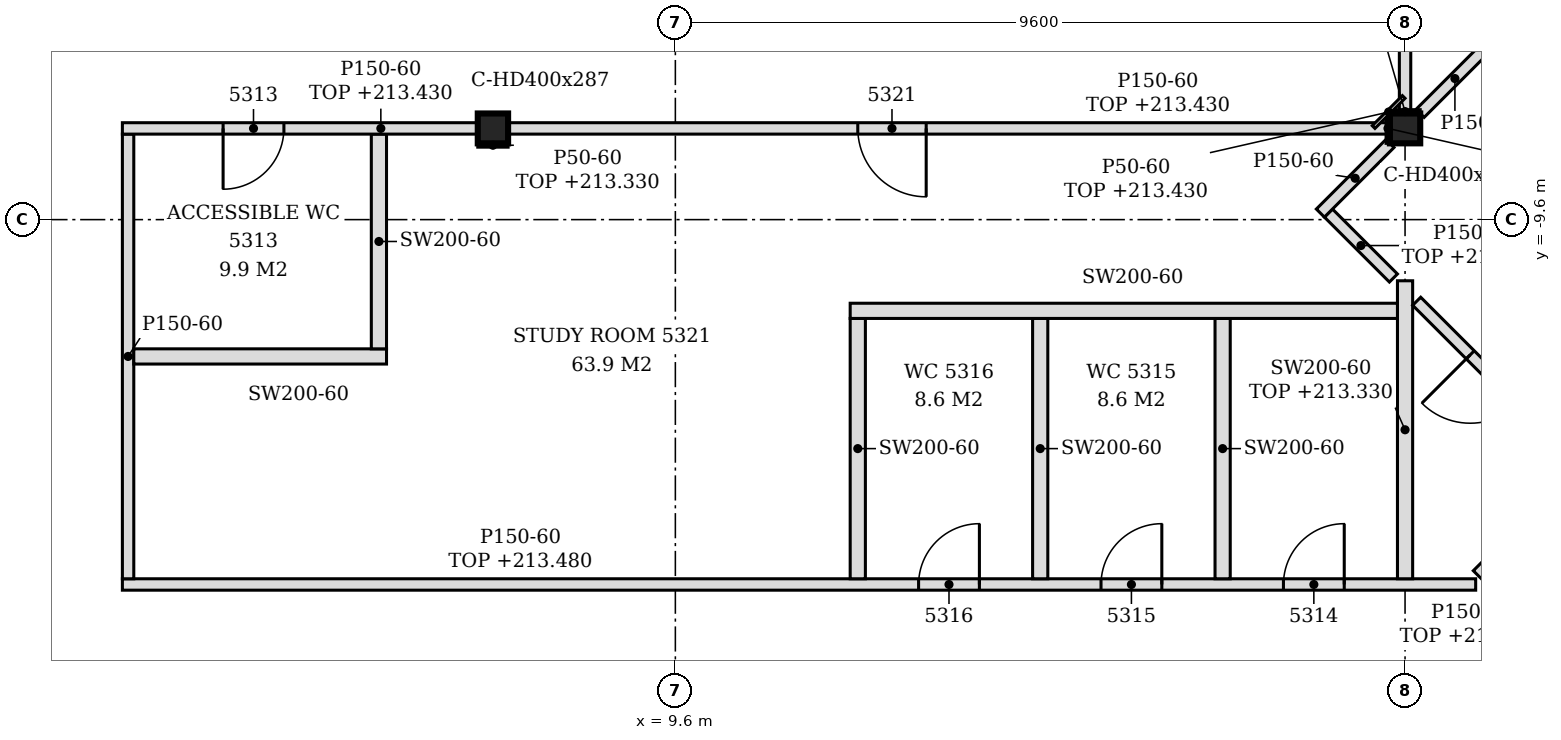
"""IFC4 building model, lengths in metres.
Left out: names, types, materials, properties, quantities, classifications, styles, units other than length and angle.
Written with IfcOpenShell. Run it as: python <this file> out.ifc"""

import sys

from ifc_helpers import new_model, si_unit, direction, frame, frame_2d, origin, origin_2d, place, context, subcontext, project, spatial, polyline, rectangle, i_section, outline, extrude, element, fill, save


model = new_model("IFC4")
c1 = context("Model", 3, precision=1e-05, world=origin(), true_north=direction((0.0, 1.0)))
c2 = subcontext(c1, "Body", "Model", "MODEL_VIEW")
j1 = project(units=[si_unit("LENGTHUNIT", "METRE"), si_unit("PLANEANGLEUNIT", "RADIAN")], contexts=[c1])
p1 = place(None, origin())
s1 = spatial("IfcSite", under=j1, at=p1, CompositionType="ELEMENT")
p2 = place(p1, origin())
s2 = spatial("IfcBuilding", under=s1, at=p2, CompositionType="ELEMENT")
p3 = place(p2, frame((0.0, 0.0, 210.6)))
s3 = spatial("IfcBuildingStorey", under=s2, at=p3, CompositionType="ELEMENT", Elevation=210.6)
for number, where, z_axis, x_axis in (
    (1, (7.2, -8.4, -0.15), (0.0, 0.0, 1.0), (1.0, 0.0, 0.0)),
    (2, (19.2, -8.4, -0.15), (0.0, 0.0, 1.0), (1.0, 0.0, 0.0)),
):
    element("IfcColumn", number, at=place(p3, frame(where, z_axis=z_axis, x_axis=x_axis)), inside=s3, PredefinedType="COLUMN", context=c2, shape_type="SweptSolid", body=[
        extrude(i_section(OverallWidth=0.399, OverallDepth=0.393, WebThickness=0.023, FlangeThickness=0.037, FilletRadius=0.015, at=origin_2d()), origin(), (0.0, 0.0, 1.0), 3.6),
    ])
p4 = place(p3, frame((2.325, -14.4, 0.0), z_axis=(0.0, 0.0, 1.0), x_axis=(1.0, 0.0, 0.0)))
e3 = element("IfcWall", 3, at=p4, inside=s3, PredefinedType="PARTITIONING", context=c2, shape_type="SweptSolid", body=[
    extrude(outline(polyline([(0.0, 0.0), (17.804, 0.0), (17.804, 2.88), (17.025, 2.88), (17.023, 2.73), (16.725, 2.73), (16.723, 2.88), (5.025, 2.88), (5.023, 2.73), (4.725, 2.73), (4.723, 2.88), (0.0, 2.88), (0.0, 0.0)])), frame((0.0, 0.075, 0.0), z_axis=(0.0, -1.0, 0.0), x_axis=(1.0, 0.0, 0.0)), (0.0, 0.0, 1.0), 0.15),
])
p5 = place(p4, frame((15.275, 0.0, 0.0)))
e4 = element("IfcOpeningElement", 4, at=p5, cuts=e3, PredefinedType="OPENING", context=c2, shape_type="SweptSolid", body=[
    extrude(rectangle(XDim=0.8, YDim=2.1, at=frame_2d((0.4, 1.05))), frame((0.0, 0.085, 0.0), z_axis=(0.0, -1.0, 0.0), x_axis=(1.0, 0.0, 0.0)), (0.0, 0.0, 1.0), 0.17),
])
p6 = place(p4, frame((12.875, 0.0, 0.0)))
e5 = element("IfcOpeningElement", 5, at=p6, cuts=e3, PredefinedType="OPENING", context=c2, shape_type="SweptSolid", body=[
    extrude(rectangle(XDim=0.8, YDim=2.1, at=frame_2d((0.4, 1.05))), frame((0.0, 0.085, 0.0), z_axis=(0.0, -1.0, 0.0), x_axis=(1.0, 0.0, 0.0)), (0.0, 0.0, 1.0), 0.17),
])
p7 = place(p4, frame((10.475, 0.0, 0.0)))
e6 = element("IfcOpeningElement", 6, at=p7, cuts=e3, PredefinedType="OPENING", context=c2, shape_type="SweptSolid", body=[
    extrude(rectangle(XDim=0.8, YDim=2.1, at=frame_2d((0.4, 1.05))), frame((0.0, 0.085, 0.0), z_axis=(0.0, -1.0, 0.0), x_axis=(1.0, 0.0, 0.0)), (0.0, 0.0, 1.0), 0.17),
])
p8 = place(p3, frame((2.4, -14.325, 0.0), z_axis=(0.0, 0.0, 1.0), x_axis=(0.0, 1.0, 0.0)))
e7 = element("IfcWall", 7, at=p8, inside=s3, PredefinedType="PARTITIONING", context=c2, shape_type="SweptSolid", body=[
    extrude(outline(polyline([(0.0, 0.0), (5.85, 0.0), (5.85, 2.83), (5.775, 2.83), (5.773, 3.45), (0.025, 3.45), (0.023, 2.93), (0.0, 2.93), (0.0, 0.0)])), frame((0.0, 0.075, 0.0), z_axis=(0.0, -1.0, 0.0), x_axis=(1.0, 0.0, 0.0)), (0.0, 0.0, 1.0), 0.15),
])
for number, where, z_axis, x_axis in (
    (8, (12.0, -14.325, 0.0), (0.0, 0.0, 1.0), (0.0, 1.0, 0.0)),
    (9, (14.4, -14.325, 0.0), (0.0, 0.0, 1.0), (0.0, 1.0, 0.0)),
    (10, (16.8, -14.325, 0.0), (0.0, 0.0, 1.0), (0.0, 1.0, 0.0)),
):
    element("IfcWall", number, at=place(p3, frame(where, z_axis=z_axis, x_axis=x_axis)), inside=s3, PredefinedType="PARTITIONING", context=c2, shape_type="SweptSolid", body=[
        extrude(outline(polyline([(0.0, 0.0), (3.425, 0.0), (3.425, 3.45), (0.03, 3.45), (0.028, 2.88), (0.0, 2.88), (0.0, 0.0)])), frame((0.0, 0.1, 0.0), z_axis=(0.0, -1.0, 0.0), x_axis=(1.0, 0.0, 0.0)), (0.0, 0.0, 1.0), 0.2),
    ])
p9 = place(p3, frame((19.2, -14.325, 0.0), z_axis=(0.0, 0.0, 1.0), x_axis=(0.0, 1.0, 0.0)))
e11 = element("IfcWall", 11, at=p9, inside=s3, PredefinedType="PARTITIONING", context=c2, shape_type="SweptSolid", body=[
    extrude(rectangle(XDim=3.92, YDim=0.2, at=frame_2d((1.96, 0.0))), origin(), (0.0, 0.0, 1.0), 2.73),
])
p10 = place(p3, frame((20.151, -14.272, 0.0), z_axis=(0.0, 0.0, 1.0), x_axis=(0.707106781187, 0.707106781187, 0.0)))
e12 = element("IfcWall", 12, at=p10, inside=s3, PredefinedType="PARTITIONING", context=c2, shape_type="SweptSolid", body=[
    extrude(rectangle(XDim=2.055, YDim=0.15, at=frame_2d((1.027, 0.0))), origin(), (0.0, 0.0, 1.0), 2.88),
])
p11 = place(p3, frame((21.498, -12.819, 0.0), z_axis=(0.0, 0.0, 1.0), x_axis=(-0.707106781187, 0.707106781187, 0.0)))
e13 = element("IfcWall", 13, at=p11, inside=s3, PredefinedType="PARTITIONING", context=c2, shape_type="SweptSolid", body=[
    extrude(rectangle(XDim=3.033, YDim=0.15, at=frame_2d((1.517, 0.0))), origin(), (0.0, 0.0, 1.0), 2.73),
])
p12 = place(p11, frame((1.137, 0.0, 0.0)))
e14 = element("IfcOpeningElement", 14, at=p12, cuts=e13, PredefinedType="OPENING", context=c2, shape_type="SweptSolid", body=[
    extrude(rectangle(XDim=0.9, YDim=2.1, at=frame_2d((0.45, 1.05))), frame((0.0, 0.085, 0.0), z_axis=(0.0, -1.0, 0.0), x_axis=(1.0, 0.0, 0.0)), (0.0, 0.0, 1.0), 0.17),
])
p13 = place(p3, frame((2.475, -11.4, 0.0), z_axis=(0.0, 0.0, 1.0), x_axis=(1.0, 0.0, 0.0)))
e15 = element("IfcWall", 15, at=p13, inside=s3, PredefinedType="PARTITIONING", context=c2, shape_type="SweptSolid", body=[
    extrude(rectangle(XDim=3.325, YDim=0.2, at=frame_2d((1.663, 0.0))), origin(), (0.0, 0.0, 1.0), 3.45),
])
p14 = place(p3, frame((5.7, -11.3, 0.0), z_axis=(0.0, 0.0, 1.0), x_axis=(0.0, 1.0, 0.0)))
e16 = element("IfcWall", 16, at=p14, inside=s3, PredefinedType="PARTITIONING", context=c2, shape_type="SweptSolid", body=[
    extrude(outline(polyline([(0.0, 0.0), (2.825, 0.0), (2.825, 2.83), (2.75, 2.83), (2.748, 3.45), (0.0, 3.45), (0.0, 0.0)])), frame((0.0, 0.1, 0.0), z_axis=(0.0, -1.0, 0.0), x_axis=(1.0, 0.0, 0.0)), (0.0, 0.0, 1.0), 0.2),
])
p15 = place(p3, frame((11.9, -10.8, 0.0), z_axis=(0.0, 0.0, 1.0), x_axis=(1.0, 0.0, 0.0)))
e17 = element("IfcWall", 17, at=p15, inside=s3, PredefinedType="PARTITIONING", context=c2, shape_type="SweptSolid", body=[
    extrude(outline(polyline([(0.0, 0.0), (7.2, 0.0), (7.2, 2.73), (7.15, 2.73), (7.148, 3.45), (0.0, 3.45), (0.0, 0.0)])), frame((0.0, 0.1, 0.0), z_axis=(0.0, -1.0, 0.0), x_axis=(1.0, 0.0, 0.0)), (0.0, 0.0, 1.0), 0.2),
])
p16 = place(p3, frame((19.047, -10.368, 0.0), z_axis=(0.0, 0.0, 1.0), x_axis=(-0.707409718716, 0.706803713817, 0.0)))
e18 = element("IfcWall", 18, at=p16, inside=s3, PredefinedType="PARTITIONING", context=c2, shape_type="SweptSolid", body=[
    extrude(rectangle(XDim=1.208, YDim=0.15, at=frame_2d((0.604, 0.0))), origin(), (0.0, 0.0, 1.0), 2.73),
])
p17 = place(p3, frame((18.086, -9.514, 0.0), z_axis=(0.0, 0.0, 1.0), x_axis=(0.707106781187, 0.707106781187, 0.0)))
e19 = element("IfcWall", 19, at=p17, inside=s3, PredefinedType="PARTITIONING", context=c2, shape_type="SweptSolid", body=[
    extrude(rectangle(XDim=1.295, YDim=0.15, at=frame_2d((0.648, 0.0))), origin(), (0.0, 0.0, 1.0), 3.45),
])
p18 = place(p3, frame((2.325, -8.4, 0.0), z_axis=(0.0, 0.0, 1.0), x_axis=(1.0, 0.0, 0.0)))
e20 = element("IfcWall", 20, at=p18, inside=s3, PredefinedType="PARTITIONING", context=c2, shape_type="SweptSolid", body=[
    extrude(rectangle(XDim=4.676, YDim=0.15, at=frame_2d((2.338, 0.0))), origin(), (0.0, 0.0, 1.0), 2.83),
])
p19 = place(p18, frame((1.325, 0.0, 0.0)))
e21 = element("IfcOpeningElement", 21, at=p19, cuts=e20, PredefinedType="OPENING", context=c2, shape_type="SweptSolid", body=[
    extrude(rectangle(XDim=0.8, YDim=2.1, at=frame_2d((0.4, 1.05))), frame((0.0, 0.085, 0.0), z_axis=(0.0, -1.0, 0.0), x_axis=(1.0, 0.0, 0.0)), (0.0, 0.0, 1.0), 0.17),
])
p20 = place(p3, frame((7.399, -8.4, 0.0), z_axis=(0.0, 0.0, 1.0), x_axis=(1.0, 0.0, 0.0)))
e22 = element("IfcWall", 22, at=p20, inside=s3, PredefinedType="PARTITIONING", context=c2, shape_type="SweptSolid", body=[
    extrude(rectangle(XDim=11.601, YDim=0.15, at=frame_2d((5.801, 0.0))), origin(), (0.0, 0.0, 1.0), 2.83),
])
p21 = place(p20, frame((4.601, 0.0, 0.0)))
e23 = element("IfcOpeningElement", 23, at=p21, cuts=e22, PredefinedType="OPENING", context=c2, shape_type="SweptSolid", body=[
    extrude(rectangle(XDim=0.9, YDim=2.1, at=frame_2d((0.45, 1.05))), frame((0.0, 0.085, 0.0), z_axis=(0.0, -1.0, 0.0), x_axis=(1.0, 0.0, 0.0)), (0.0, 0.0, 1.0), 0.17),
])
p22 = place(p3, frame((19.2, -8.204, 0.0), z_axis=(0.0, 0.0, 1.0), x_axis=(0.0, 1.0, 0.0)))
e24 = element("IfcWall", 24, at=p22, inside=s3, PredefinedType="PARTITIONING", context=c2, shape_type="SweptSolid", body=[
    extrude(rectangle(XDim=4.529, YDim=0.15, at=frame_2d((2.264, 0.0))), origin(), (0.0, 0.0, 1.0), 2.83),
])
p23 = place(p3, frame((19.398, -8.202, 0.0), z_axis=(0.0, 0.0, 1.0), x_axis=(0.707200993001, 0.707012556818, 0.0)))
e25 = element("IfcWall", 25, at=p23, inside=s3, PredefinedType="PARTITIONING", context=c2, shape_type="SweptSolid", body=[
    extrude(rectangle(XDim=1.296, YDim=0.15, at=frame_2d((0.648, 0.0))), origin(), (0.0, 0.0, 1.0), 3.45),
])
p24 = place(p3, frame((18.786, -8.382, 0.0), z_axis=(0.0, 0.0, 1.0), x_axis=(0.707106781187, 0.707106781187, 0.0)))
e26 = element("IfcWall", 26, at=p24, inside=s3, PredefinedType="PARTITIONING", context=c2, shape_type="SweptSolid", body=[
    extrude(rectangle(XDim=0.56, YDim=0.05, at=frame_2d((0.28, 0.0))), origin(), (0.0, 0.0, 1.0), 2.83),
])
p25 = place(p3, frame((7.0, -8.622, 0.0), z_axis=(0.0, 0.0, 1.0), x_axis=(1.0, 0.0, 0.0)))
e27 = element("IfcWall", 27, at=p25, inside=s3, PredefinedType="PARTITIONING", context=c2, shape_type="SweptSolid", body=[
    extrude(rectangle(XDim=0.399, YDim=0.05, at=frame_2d((0.199, 0.0))), origin(), (0.0, 0.0, 1.0), 2.73),
])
p26 = place(p3, frame((19.0, -8.178, 0.0), z_axis=(0.0, 0.0, 1.0), x_axis=(1.0, 0.0, 0.0)))
e28 = element("IfcWall", 28, at=p26, inside=s3, PredefinedType="PARTITIONING", context=c2, shape_type="SweptSolid", body=[
    extrude(rectangle(XDim=0.399, YDim=0.05, at=frame_2d((0.199, 0.0))), origin(), (0.0, 0.0, 1.0), 2.83),
])
p27 = place(p3, frame((18.976, -8.596, 0.0), z_axis=(0.0, 0.0, 1.0), x_axis=(0.0, 1.0, 0.0)))
e29 = element("IfcWall", 29, at=p27, inside=s3, PredefinedType="PARTITIONING", context=c2, shape_type="SweptSolid", body=[
    extrude(rectangle(XDim=0.393, YDim=0.05, at=frame_2d((0.196, 0.0))), origin(), (0.0, 0.0, 1.0), 2.83),
])
p28 = place(p19, frame((0.8, 0.0, 0.0), z_axis=(0.0, 0.0, 1.0), x_axis=(-1.0, 0.0, 0.0)))
e30 = element("IfcDoor", 30, at=p28, inside=s3, OperationType="SINGLE_SWING_RIGHT", PredefinedType="DOOR", context=c2, shape_type="SweptSolid", body=[
    extrude(rectangle(XDim=0.8, YDim=2.1, at=frame_2d((0.4, 1.05))), frame((0.0, 0.025, 0.0), z_axis=(0.0, -1.0, 0.0), x_axis=(1.0, 0.0, 0.0)), (0.0, 0.0, 1.0), 0.05),
])
fill(e21, e30)
p29 = place(p5, origin())
e31 = element("IfcDoor", 31, at=p29, inside=s3, OperationType="SINGLE_SWING_RIGHT", PredefinedType="DOOR", context=c2, shape_type="SweptSolid", body=[
    extrude(rectangle(XDim=0.8, YDim=2.1, at=frame_2d((0.4, 1.05))), frame((0.0, 0.025, 0.0), z_axis=(0.0, -1.0, 0.0), x_axis=(1.0, 0.0, 0.0)), (0.0, 0.0, 1.0), 0.05),
])
fill(e4, e31)
p30 = place(p6, origin())
e32 = element("IfcDoor", 32, at=p30, inside=s3, OperationType="SINGLE_SWING_RIGHT", PredefinedType="DOOR", context=c2, shape_type="SweptSolid", body=[
    extrude(rectangle(XDim=0.8, YDim=2.1, at=frame_2d((0.4, 1.05))), frame((0.0, 0.025, 0.0), z_axis=(0.0, -1.0, 0.0), x_axis=(1.0, 0.0, 0.0)), (0.0, 0.0, 1.0), 0.05),
])
fill(e5, e32)
p31 = place(p7, origin())
e33 = element("IfcDoor", 33, at=p31, inside=s3, OperationType="SINGLE_SWING_RIGHT", PredefinedType="DOOR", context=c2, shape_type="SweptSolid", body=[
    extrude(rectangle(XDim=0.8, YDim=2.1, at=frame_2d((0.4, 1.05))), frame((0.0, 0.025, 0.0), z_axis=(0.0, -1.0, 0.0), x_axis=(1.0, 0.0, 0.0)), (0.0, 0.0, 1.0), 0.05),
])
fill(e6, e33)
p32 = place(p12, origin())
e34 = element("IfcDoor", 34, at=p32, inside=s3, OperationType="SINGLE_SWING_RIGHT", PredefinedType="DOOR", context=c2, shape_type="SweptSolid", body=[
    extrude(rectangle(XDim=0.9, YDim=2.1, at=frame_2d((0.45, 1.05))), frame((0.0, 0.025, 0.0), z_axis=(0.0, -1.0, 0.0), x_axis=(1.0, 0.0, 0.0)), (0.0, 0.0, 1.0), 0.05),
])
fill(e14, e34)
p33 = place(p21, frame((0.9, 0.0, 0.0), z_axis=(0.0, 0.0, 1.0), x_axis=(-1.0, 0.0, 0.0)))
e35 = element("IfcDoor", 35, at=p33, inside=s3, OperationType="SINGLE_SWING_LEFT", PredefinedType="DOOR", context=c2, shape_type="SweptSolid", body=[
    extrude(rectangle(XDim=0.9, YDim=2.1, at=frame_2d((0.45, 1.05))), frame((0.0, 0.025, 0.0), z_axis=(0.0, -1.0, 0.0), x_axis=(1.0, 0.0, 0.0)), (0.0, 0.0, 1.0), 0.05),
])
fill(e23, e35)
save(model, sys.argv[1])
